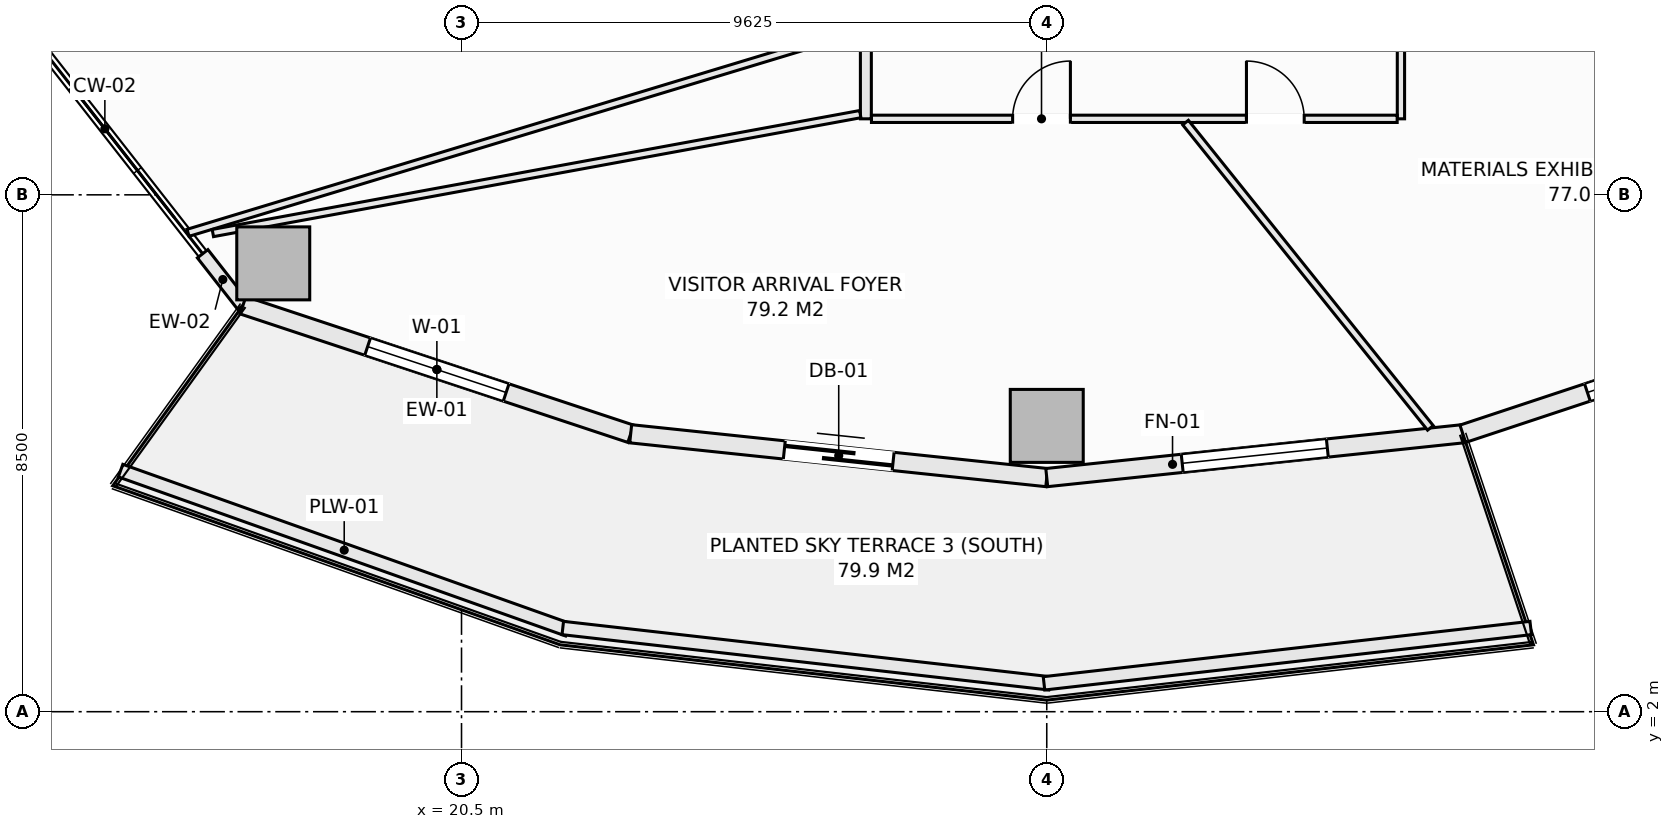
"""IFC4 building model, lengths in metres.
Left out: names, types, materials, properties, quantities, classifications, styles, units other than length and angle.
Written with IfcOpenShell. Run it as: python <this file> out.ifc"""

import sys

from ifc_helpers import new_model, si_unit, direction, frame, frame_2d, origin, origin_2d, place, context, subcontext, project, spatial, rectangle, extrude, element, fill, save


model = new_model("IFC4")
c1 = context("Model", 3, precision=1e-05, world=origin(), true_north=direction((0.0, 1.0)))
c2 = subcontext(c1, "Body", "Model", "MODEL_VIEW")
j1 = project(units=[si_unit("LENGTHUNIT", "METRE"), si_unit("PLANEANGLEUNIT", "RADIAN")], contexts=[c1])
p1 = place(None, origin())
s1 = spatial("IfcSite", under=j1, at=p1, CompositionType="ELEMENT")
p2 = place(p1, origin())
s2 = spatial("IfcBuilding", under=s1, at=p2, CompositionType="ELEMENT")
p3 = place(p2, frame((0.0, 0.0, 53.45)))
s3 = spatial("IfcBuildingStorey", under=s2, at=p3, CompositionType="ELEMENT", Elevation=53.45)
for number, where, z_axis, x_axis in (
    (1, (17.404, 9.373, -0.28), (0.0, 0.0, 1.0), (1.0, 0.0, 0.0)),
    (2, (30.125, 6.7, -0.28), (0.0, 0.0, 1.0), (1.0, 0.0, 0.0)),
):
    element("IfcColumn", number, at=place(p3, frame(where, z_axis=z_axis, x_axis=x_axis)), inside=s3, PredefinedType="COLUMN", context=c2, shape_type="SweptSolid", body=[
        extrude(rectangle(XDim=1.2, YDim=1.2, at=origin_2d()), origin(), (0.0, 0.0, 1.0), 3.85),
    ])
p4 = place(p3, frame((16.243, 9.531, 0.0), z_axis=(0.0, 0.0, 1.0), x_axis=(0.616418327775, -0.787418849903, 0.0)))
e3 = element("IfcWall", 3, at=p4, inside=s3, PredefinedType="SOLIDWALL", context=c2, shape_type="SweptSolid", body=[
    extrude(rectangle(XDim=1.076, YDim=0.22, at=frame_2d((0.538, 0.0))), origin(), (0.0, 0.0, 1.0), 3.093),
])
p5 = place(p3, frame((16.906, 8.684, 0.0), z_axis=(0.0, 0.0, 1.0), x_axis=(0.949245153629, -0.314537181127, 0.0)))
e4 = element("IfcWall", 4, at=p5, inside=s3, PredefinedType="SOLIDWALL", context=c2, shape_type="SweptSolid", body=[
    extrude(rectangle(XDim=6.717, YDim=0.3, at=frame_2d((3.358, 0.0))), origin(), (0.0, 0.0, 1.0), 3.093),
])
p6 = place(p5, frame((2.159, 0.0, 0.85)))
e5 = element("IfcOpeningElement", 5, at=p6, cuts=e4, PredefinedType="OPENING", context=c2, shape_type="SweptSolid", body=[
    extrude(rectangle(XDim=2.4, YDim=1.9, at=frame_2d((1.2, 0.95))), frame((0.0, 0.16, 0.0), z_axis=(0.0, -1.0, 0.0), x_axis=(1.0, 0.0, 0.0)), (0.0, 0.0, 1.0), 0.32),
])
p7 = place(p3, frame((23.282, 6.571, 0.0), z_axis=(0.0, 0.0, 1.0), x_axis=(0.994498840295, -0.104747585419, 0.0)))
e6 = element("IfcWall", 6, at=p7, inside=s3, PredefinedType="SOLIDWALL", context=c2, shape_type="SweptSolid", body=[
    extrude(rectangle(XDim=6.88, YDim=0.3, at=frame_2d((3.44, 0.0))), origin(), (0.0, 0.0, 1.0), 3.093),
])
p8 = place(p7, frame((2.54, 0.0, 0.0)))
e7 = element("IfcOpeningElement", 7, at=p8, cuts=e6, PredefinedType="OPENING", context=c2, shape_type="SweptSolid", body=[
    extrude(rectangle(XDim=1.8, YDim=2.25, at=frame_2d((0.9, 1.125))), frame((0.0, 0.16, 0.0), z_axis=(0.0, -1.0, 0.0), x_axis=(1.0, 0.0, 0.0)), (0.0, 0.0, 1.0), 0.32),
])
p9 = place(p3, frame((30.125, 5.85, 0.0), z_axis=(0.0, 0.0, 1.0), x_axis=(0.994498840295, 0.104747585419, 0.0)))
e8 = element("IfcWall", 8, at=p9, inside=s3, PredefinedType="SOLIDWALL", context=c2, shape_type="SweptSolid", body=[
    extrude(rectangle(XDim=6.88, YDim=0.3, at=frame_2d((3.44, 0.0))), origin(), (0.0, 0.0, 1.0), 3.093),
])
p10 = place(p9, frame((2.24, 0.0, 0.85)))
e9 = element("IfcOpeningElement", 9, at=p10, cuts=e8, PredefinedType="OPENING", context=c2, shape_type="SweptSolid", body=[
    extrude(rectangle(XDim=2.4, YDim=1.9, at=frame_2d((1.2, 0.95))), frame((0.0, 0.16, 0.0), z_axis=(0.0, -1.0, 0.0), x_axis=(1.0, 0.0, 0.0)), (0.0, 0.0, 1.0), 0.32),
])
p11 = place(p3, frame((36.968, 6.571, 0.0), z_axis=(0.0, 0.0, 1.0), x_axis=(0.949245153629, 0.314537181127, 0.0)))
e10 = element("IfcWall", 10, at=p11, inside=s3, PredefinedType="SOLIDWALL", context=c2, shape_type="SweptSolid", body=[
    extrude(rectangle(XDim=6.717, YDim=0.3, at=frame_2d((3.358, 0.0))), origin(), (0.0, 0.0, 1.0), 3.093),
])
p12 = place(p11, frame((2.159, 0.0, 0.85)))
e11 = element("IfcOpeningElement", 11, at=p12, cuts=e10, PredefinedType="OPENING", context=c2, shape_type="SweptSolid", body=[
    extrude(rectangle(XDim=2.4, YDim=1.9, at=frame_2d((1.2, 0.95))), frame((0.0, 0.16, 0.0), z_axis=(0.0, -1.0, 0.0), x_axis=(1.0, 0.0, 0.0)), (0.0, 0.0, 1.0), 0.32),
])
p13 = place(p3, frame((14.893, 5.965, 0.0), z_axis=(0.0, 0.0, 1.0), x_axis=(0.942203722205, -0.335040513764, 0.0)))
e12 = element("IfcWall", 12, at=p13, inside=s3, PredefinedType="PARAPET", context=c2, shape_type="SweptSolid", body=[
    extrude(rectangle(XDim=7.807, YDim=0.22, at=frame_2d((3.904, 0.0))), origin(), (0.0, 0.0, 1.0), 0.52),
])
for number, where, z_axis, x_axis in (
    (13, (22.166, 3.376, 0.0), (0.0, 0.0, 1.0), (0.994, -0.113, 0.0)),
    (14, (30.08, 2.466, 0.0), (0.0, 0.0, 1.0), (0.994, 0.113, 0.0)),
):
    element("IfcWall", number, at=place(p3, frame(where, z_axis=z_axis, x_axis=x_axis)), inside=s3, PredefinedType="PARAPET", context=c2, shape_type="SweptSolid", body=[
        extrude(rectangle(XDim=8.056, YDim=0.22, at=frame_2d((4.028, 0.0))), origin(), (0.0, 0.0, 1.0), 0.52),
    ])
p14 = place(p3, frame((27.15, 11.75, 0.0), z_axis=(0.0, 0.0, 1.0), x_axis=(0.0, 1.0, 0.0)))
e15 = element("IfcWall", 15, at=p14, inside=s3, PredefinedType="SOLIDWALL", context=c2, shape_type="SweptSolid", body=[
    extrude(rectangle(XDim=5.208, YDim=0.18, at=frame_2d((2.604, 0.0))), origin(), (0.0, 0.0, 1.0), 3.57),
])
p15 = place(p14, frame((2.668, 0.0, 0.0)))
e16 = element("IfcOpeningElement", 16, at=p15, cuts=e15, PredefinedType="OPENING", context=c2, shape_type="SweptSolid", body=[
    extrude(rectangle(XDim=0.95, YDim=2.1, at=frame_2d((0.475, 1.05))), frame((0.0, 0.1, 0.0), z_axis=(0.0, -1.0, 0.0), x_axis=(1.0, 0.0, 0.0)), (0.0, 0.0, 1.0), 0.2),
])
p16 = place(p3, frame((35.95, 11.75, 0.0), z_axis=(0.0, 0.0, 1.0), x_axis=(0.0, 1.0, 0.0)))
e17 = element("IfcWall", 17, at=p16, inside=s3, PredefinedType="PARTITIONING", context=c2, shape_type="SweptSolid", body=[
    extrude(rectangle(XDim=3.838, YDim=0.12, at=frame_2d((1.919, 0.0))), origin(), (0.0, 0.0, 1.0), 3.57),
])
p17 = place(p16, frame((2.092, 0.0, 0.0)))
e18 = element("IfcOpeningElement", 18, at=p17, cuts=e17, PredefinedType="OPENING", context=c2, shape_type="SweptSolid", body=[
    extrude(rectangle(XDim=0.95, YDim=2.1, at=frame_2d((0.475, 1.05))), frame((0.0, 0.07, 0.0), z_axis=(0.0, -1.0, 0.0), x_axis=(1.0, 0.0, 0.0)), (0.0, 0.0, 1.0), 0.14),
])
p18 = place(p3, frame((27.242, 11.75, 0.0), z_axis=(0.0, 0.0, 1.0), x_axis=(1.0, 0.0, 0.0)))
e19 = element("IfcWall", 19, at=p18, inside=s3, PredefinedType="PARTITIONING", context=c2, shape_type="SweptSolid", body=[
    extrude(rectangle(XDim=8.646, YDim=0.12, at=frame_2d((4.323, 0.0))), origin(), (0.0, 0.0, 1.0), 3.57),
])
p19 = place(p18, frame((2.322, 0.0, 0.0)))
e20 = element("IfcOpeningElement", 20, at=p19, cuts=e19, PredefinedType="OPENING", context=c2, shape_type="SweptSolid", body=[
    extrude(rectangle(XDim=0.95, YDim=2.1, at=frame_2d((0.475, 1.05))), frame((0.0, 0.07, 0.0), z_axis=(0.0, -1.0, 0.0), x_axis=(1.0, 0.0, 0.0)), (0.0, 0.0, 1.0), 0.14),
])
p20 = place(p18, frame((6.167, 0.0, 0.0)))
e21 = element("IfcOpeningElement", 21, at=p20, cuts=e19, PredefinedType="OPENING", context=c2, shape_type="SweptSolid", body=[
    extrude(rectangle(XDim=0.95, YDim=2.1, at=frame_2d((0.475, 1.05))), frame((0.0, 0.07, 0.0), z_axis=(0.0, -1.0, 0.0), x_axis=(1.0, 0.0, 0.0)), (0.0, 0.0, 1.0), 0.14),
])
p21 = place(p3, frame((16.002, 9.875, 0.0), z_axis=(0.0, 0.0, 1.0), x_axis=(0.957126559036, 0.289670070921, 0.0)))
e22 = element("IfcWall", 22, at=p21, inside=s3, PredefinedType="PARTITIONING", context=c2, shape_type="SweptSolid", body=[
    extrude(rectangle(XDim=11.551, YDim=0.12, at=frame_2d((5.775, 0.0))), origin(), (0.0, 0.0, 1.0), 2.934),
])
p22 = place(p3, frame((16.41, 9.871, 0.0), z_axis=(0.0, 0.0, 1.0), x_axis=(0.983545367139, 0.180661315116, 0.0)))
e23 = element("IfcWall", 23, at=p22, inside=s3, PredefinedType="PARTITIONING", context=c2, shape_type="SweptSolid", body=[
    extrude(rectangle(XDim=10.826, YDim=0.12, at=frame_2d((5.413, 0.0))), origin(), (0.0, 0.0, 1.0), 3.57),
])
p23 = place(p3, frame((32.408, 11.688, 0.0), z_axis=(0.0, 0.0, 1.0), x_axis=(0.625707614962, -0.780057677725, 0.0)))
e24 = element("IfcWall", 24, at=p23, inside=s3, PredefinedType="PARTITIONING", context=c2, shape_type="SweptSolid", body=[
    extrude(rectangle(XDim=6.436, YDim=0.12, at=frame_2d((3.218, 0.0))), origin(), (0.0, 0.0, 1.0), 3.57),
])
p24 = place(p6, origin())
e25 = element("IfcWindow", 25, at=p24, inside=s3, PartitioningType="SINGLE_PANEL", PredefinedType="WINDOW", context=c2, shape_type="SweptSolid", body=[
    extrude(rectangle(XDim=2.4, YDim=1.9, at=frame_2d((1.2, 0.95))), frame((0.0, 0.03, 0.0), z_axis=(0.0, -1.0, 0.0), x_axis=(1.0, 0.0, 0.0)), (0.0, 0.0, 1.0), 0.06),
])
fill(e5, e25)
p25 = place(p8, frame((1.8, 0.0, 0.0), z_axis=(0.0, 0.0, 1.0), x_axis=(-1.0, 0.0, 0.0)))
e26 = element("IfcDoor", 26, at=p25, inside=s3, OperationType="SLIDING_TO_LEFT", PredefinedType="DOOR", context=c2, shape_type="SweptSolid", body=[
    extrude(rectangle(XDim=1.8, YDim=2.25, at=frame_2d((0.9, 1.125))), frame((0.0, 0.025, 0.0), z_axis=(0.0, -1.0, 0.0), x_axis=(1.0, 0.0, 0.0)), (0.0, 0.0, 1.0), 0.05),
])
fill(e7, e26)
p26 = place(p10, origin())
e27 = element("IfcWindow", 27, at=p26, inside=s3, PartitioningType="SINGLE_PANEL", PredefinedType="WINDOW", context=c2, shape_type="SweptSolid", body=[
    extrude(rectangle(XDim=2.4, YDim=1.9, at=frame_2d((1.2, 0.95))), frame((0.0, 0.03, 0.0), z_axis=(0.0, -1.0, 0.0), x_axis=(1.0, 0.0, 0.0)), (0.0, 0.0, 1.0), 0.06),
])
fill(e9, e27)
p27 = place(p12, origin())
e28 = element("IfcWindow", 28, at=p27, inside=s3, PartitioningType="SINGLE_PANEL", PredefinedType="WINDOW", context=c2, shape_type="SweptSolid", body=[
    extrude(rectangle(XDim=2.4, YDim=1.9, at=frame_2d((1.2, 0.95))), frame((0.0, 0.03, 0.0), z_axis=(0.0, -1.0, 0.0), x_axis=(1.0, 0.0, 0.0)), (0.0, 0.0, 1.0), 0.06),
])
fill(e11, e28)
p28 = place(p19, origin())
e29 = element("IfcDoor", 29, at=p28, inside=s3, OperationType="SINGLE_SWING_RIGHT", PredefinedType="DOOR", context=c2, shape_type="SweptSolid", body=[
    extrude(rectangle(XDim=0.95, YDim=2.1, at=frame_2d((0.475, 1.05))), frame((0.0, 0.025, 0.0), z_axis=(0.0, -1.0, 0.0), x_axis=(1.0, 0.0, 0.0)), (0.0, 0.0, 1.0), 0.05),
])
fill(e20, e29)
p29 = place(p20, origin())
e30 = element("IfcDoor", 30, at=p29, inside=s3, OperationType="SINGLE_SWING_LEFT", PredefinedType="DOOR", context=c2, shape_type="SweptSolid", body=[
    extrude(rectangle(XDim=0.95, YDim=2.1, at=frame_2d((0.475, 1.05))), frame((0.0, 0.025, 0.0), z_axis=(0.0, -1.0, 0.0), x_axis=(1.0, 0.0, 0.0)), (0.0, 0.0, 1.0), 0.05),
])
fill(e21, e30)
save(model, sys.argv[1])
